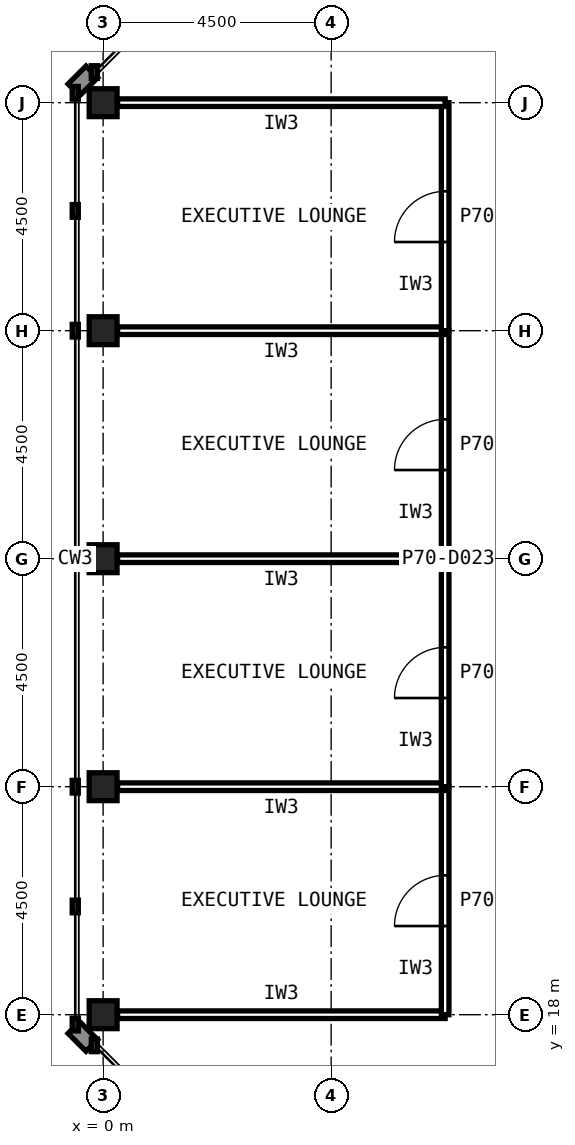
"""IFC4 building model, lengths in metres.
Left out: names, types, materials, properties, quantities, classifications, styles, units other than length and angle.
Written with IfcOpenShell. Run it as: python <this file> out.ifc"""

import sys

from ifc_helpers import new_model, si_unit, direction, frame, frame_2d, origin, origin_2d, place, context, subcontext, project, spatial, rectangle, hollow_rectangle, extrude, element, fill, save


model = new_model("IFC4")
c1 = context("Model", 3, precision=1e-05, world=origin(), true_north=direction((0.0, 1.0)))
c2 = subcontext(c1, "Body", "Model", "MODEL_VIEW")
j1 = project(units=[si_unit("LENGTHUNIT", "METRE"), si_unit("PLANEANGLEUNIT", "RADIAN")], contexts=[c1])
p1 = place(None, origin())
s1 = spatial("IfcSite", under=j1, at=p1, CompositionType="ELEMENT")
p2 = place(p1, origin())
s2 = spatial("IfcBuilding", under=s1, at=p2, CompositionType="ELEMENT")
p3 = place(p2, frame((0.0, 0.0, 294.6)))
s3 = spatial("IfcBuildingStorey", under=s2, at=p3, CompositionType="ELEMENT", Elevation=294.6)
for number, where, z_axis, x_axis in (
    (1, (0.0, 36.0, 0.0), (0.0, 0.0, 1.0), (1.0, 0.0, 0.0)),
    (2, (0.0, 31.5, 0.0), (0.0, 0.0, 1.0), (1.0, 0.0, 0.0)),
    (3, (0.0, 27.0, 0.0), (0.0, 0.0, 1.0), (1.0, 0.0, 0.0)),
    (4, (0.0, 22.5, 0.0), (0.0, 0.0, 1.0), (1.0, 0.0, 0.0)),
    (5, (0.0, 18.0, 0.0), (0.0, 0.0, 1.0), (1.0, 0.0, 0.0)),
):
    element("IfcColumn", number, at=place(p3, frame(where, z_axis=z_axis, x_axis=x_axis)), inside=s3, PredefinedType="COLUMN", context=c2, shape_type="SweptSolid", body=[
        extrude(hollow_rectangle(XDim=0.55, YDim=0.55, WallThickness=0.025, at=origin_2d()), origin(), (0.0, 0.0, 1.0), 4.0),
    ])
p4 = place(p3, frame((0.285, 18.0, 0.0), z_axis=(0.0, 0.0, 1.0), x_axis=(1.0, 0.0, 0.0)))
e6 = element("IfcWall", 6, at=p4, inside=s3, PredefinedType="PARTITIONING", context=c2, shape_type="SweptSolid", body=[
    extrude(rectangle(XDim=6.465, YDim=0.15, at=frame_2d((3.232, 0.0))), origin(), (0.0, 0.0, 1.0), 2.989),
])
p5 = place(p3, frame((6.75, 18.0, 0.0), z_axis=(0.0, 0.0, 1.0), x_axis=(0.0, 1.0, 0.0)))
e7 = element("IfcWall", 7, at=p5, inside=s3, PredefinedType="PARTITIONING", context=c2, shape_type="SweptSolid", body=[
    extrude(rectangle(XDim=4.5, YDim=0.15, at=frame_2d((2.25, 0.0))), origin(), (0.0, 0.0, 1.0), 3.84),
])
p6 = place(p5, frame((1.75, 0.0, 0.0)))
e8 = element("IfcOpeningElement", 8, at=p6, cuts=e7, PredefinedType="OPENING", context=c2, shape_type="SweptSolid", body=[
    extrude(rectangle(XDim=1.0, YDim=2.1, at=frame_2d((0.5, 1.05))), frame((0.0, 0.085, 0.0), z_axis=(0.0, -1.0, 0.0), x_axis=(1.0, 0.0, 0.0)), (0.0, 0.0, 1.0), 0.17),
])
p7 = place(p3, frame((6.75, 22.5, 0.0), z_axis=(0.0, 0.0, 1.0), x_axis=(-1.0, 0.0, 0.0)))
e9 = element("IfcWall", 9, at=p7, inside=s3, PredefinedType="PARTITIONING", context=c2, shape_type="SweptSolid", body=[
    extrude(rectangle(XDim=6.465, YDim=0.15, at=frame_2d((3.232, 0.0))), origin(), (0.0, 0.0, 1.0), 2.989),
])
p8 = place(p3, frame((6.75, 22.5, 0.0), z_axis=(0.0, 0.0, 1.0), x_axis=(0.0, 1.0, 0.0)))
e10 = element("IfcWall", 10, at=p8, inside=s3, PredefinedType="PARTITIONING", context=c2, shape_type="SweptSolid", body=[
    extrude(rectangle(XDim=4.5, YDim=0.15, at=frame_2d((2.25, 0.0))), origin(), (0.0, 0.0, 1.0), 3.84),
])
p9 = place(p8, frame((1.75, 0.0, 0.0)))
e11 = element("IfcOpeningElement", 11, at=p9, cuts=e10, PredefinedType="OPENING", context=c2, shape_type="SweptSolid", body=[
    extrude(rectangle(XDim=1.0, YDim=2.1, at=frame_2d((0.5, 1.05))), frame((0.0, 0.085, 0.0), z_axis=(0.0, -1.0, 0.0), x_axis=(1.0, 0.0, 0.0)), (0.0, 0.0, 1.0), 0.17),
])
p10 = place(p3, frame((6.75, 27.0, 0.0), z_axis=(0.0, 0.0, 1.0), x_axis=(-1.0, 0.0, 0.0)))
e12 = element("IfcWall", 12, at=p10, inside=s3, PredefinedType="PARTITIONING", context=c2, shape_type="SweptSolid", body=[
    extrude(rectangle(XDim=6.465, YDim=0.15, at=frame_2d((3.232, 0.0))), origin(), (0.0, 0.0, 1.0), 2.989),
])
p11 = place(p3, frame((6.75, 27.0, 0.0), z_axis=(0.0, 0.0, 1.0), x_axis=(0.0, 1.0, 0.0)))
e13 = element("IfcWall", 13, at=p11, inside=s3, PredefinedType="PARTITIONING", context=c2, shape_type="SweptSolid", body=[
    extrude(rectangle(XDim=4.5, YDim=0.15, at=frame_2d((2.25, 0.0))), origin(), (0.0, 0.0, 1.0), 3.84),
])
p12 = place(p11, frame((1.75, 0.0, 0.0)))
e14 = element("IfcOpeningElement", 14, at=p12, cuts=e13, PredefinedType="OPENING", context=c2, shape_type="SweptSolid", body=[
    extrude(rectangle(XDim=1.0, YDim=2.1, at=frame_2d((0.5, 1.05))), frame((0.0, 0.085, 0.0), z_axis=(0.0, -1.0, 0.0), x_axis=(1.0, 0.0, 0.0)), (0.0, 0.0, 1.0), 0.17),
])
p13 = place(p3, frame((6.75, 31.5, 0.0), z_axis=(0.0, 0.0, 1.0), x_axis=(-1.0, 0.0, 0.0)))
e15 = element("IfcWall", 15, at=p13, inside=s3, PredefinedType="PARTITIONING", context=c2, shape_type="SweptSolid", body=[
    extrude(rectangle(XDim=6.465, YDim=0.15, at=frame_2d((3.232, 0.0))), origin(), (0.0, 0.0, 1.0), 2.989),
])
p14 = place(p3, frame((6.75, 31.5, 0.0), z_axis=(0.0, 0.0, 1.0), x_axis=(0.0, 1.0, 0.0)))
e16 = element("IfcWall", 16, at=p14, inside=s3, PredefinedType="PARTITIONING", context=c2, shape_type="SweptSolid", body=[
    extrude(rectangle(XDim=4.5, YDim=0.15, at=frame_2d((2.25, 0.0))), origin(), (0.0, 0.0, 1.0), 3.84),
])
p15 = place(p14, frame((1.75, 0.0, 0.0)))
e17 = element("IfcOpeningElement", 17, at=p15, cuts=e16, PredefinedType="OPENING", context=c2, shape_type="SweptSolid", body=[
    extrude(rectangle(XDim=1.0, YDim=2.1, at=frame_2d((0.5, 1.05))), frame((0.0, 0.085, 0.0), z_axis=(0.0, -1.0, 0.0), x_axis=(1.0, 0.0, 0.0)), (0.0, 0.0, 1.0), 0.17),
])
p16 = place(p3, frame((6.75, 36.0, 0.0), z_axis=(0.0, 0.0, 1.0), x_axis=(-1.0, 0.0, 0.0)))
e18 = element("IfcWall", 18, at=p16, inside=s3, PredefinedType="PARTITIONING", context=c2, shape_type="SweptSolid", body=[
    extrude(rectangle(XDim=6.465, YDim=0.15, at=frame_2d((3.232, 0.0))), origin(), (0.0, 0.0, 1.0), 2.989),
])
p17 = place(p6, origin())
e19 = element("IfcDoor", 19, at=p17, inside=s3, OperationType="SINGLE_SWING_LEFT", PredefinedType="DOOR", context=c2, shape_type="SweptSolid", body=[
    extrude(rectangle(XDim=1.0, YDim=2.1, at=frame_2d((0.5, 1.05))), frame((0.0, 0.025, 0.0), z_axis=(0.0, -1.0, 0.0), x_axis=(1.0, 0.0, 0.0)), (0.0, 0.0, 1.0), 0.05),
])
fill(e8, e19)
p18 = place(p9, origin())
e20 = element("IfcDoor", 20, at=p18, inside=s3, OperationType="SINGLE_SWING_LEFT", PredefinedType="DOOR", context=c2, shape_type="SweptSolid", body=[
    extrude(rectangle(XDim=1.0, YDim=2.1, at=frame_2d((0.5, 1.05))), frame((0.0, 0.025, 0.0), z_axis=(0.0, -1.0, 0.0), x_axis=(1.0, 0.0, 0.0)), (0.0, 0.0, 1.0), 0.05),
])
fill(e11, e20)
p19 = place(p12, origin())
e21 = element("IfcDoor", 21, at=p19, inside=s3, OperationType="SINGLE_SWING_LEFT", PredefinedType="DOOR", context=c2, shape_type="SweptSolid", body=[
    extrude(rectangle(XDim=1.0, YDim=2.1, at=frame_2d((0.5, 1.05))), frame((0.0, 0.025, 0.0), z_axis=(0.0, -1.0, 0.0), x_axis=(1.0, 0.0, 0.0)), (0.0, 0.0, 1.0), 0.05),
])
fill(e14, e21)
p20 = place(p15, origin())
e22 = element("IfcDoor", 22, at=p20, inside=s3, OperationType="SINGLE_SWING_LEFT", PredefinedType="DOOR", context=c2, shape_type="SweptSolid", body=[
    extrude(rectangle(XDim=1.0, YDim=2.1, at=frame_2d((0.5, 1.05))), frame((0.0, 0.025, 0.0), z_axis=(0.0, -1.0, 0.0), x_axis=(1.0, 0.0, 0.0)), (0.0, 0.0, 1.0), 0.05),
])
fill(e17, e22)
save(model, sys.argv[1])
